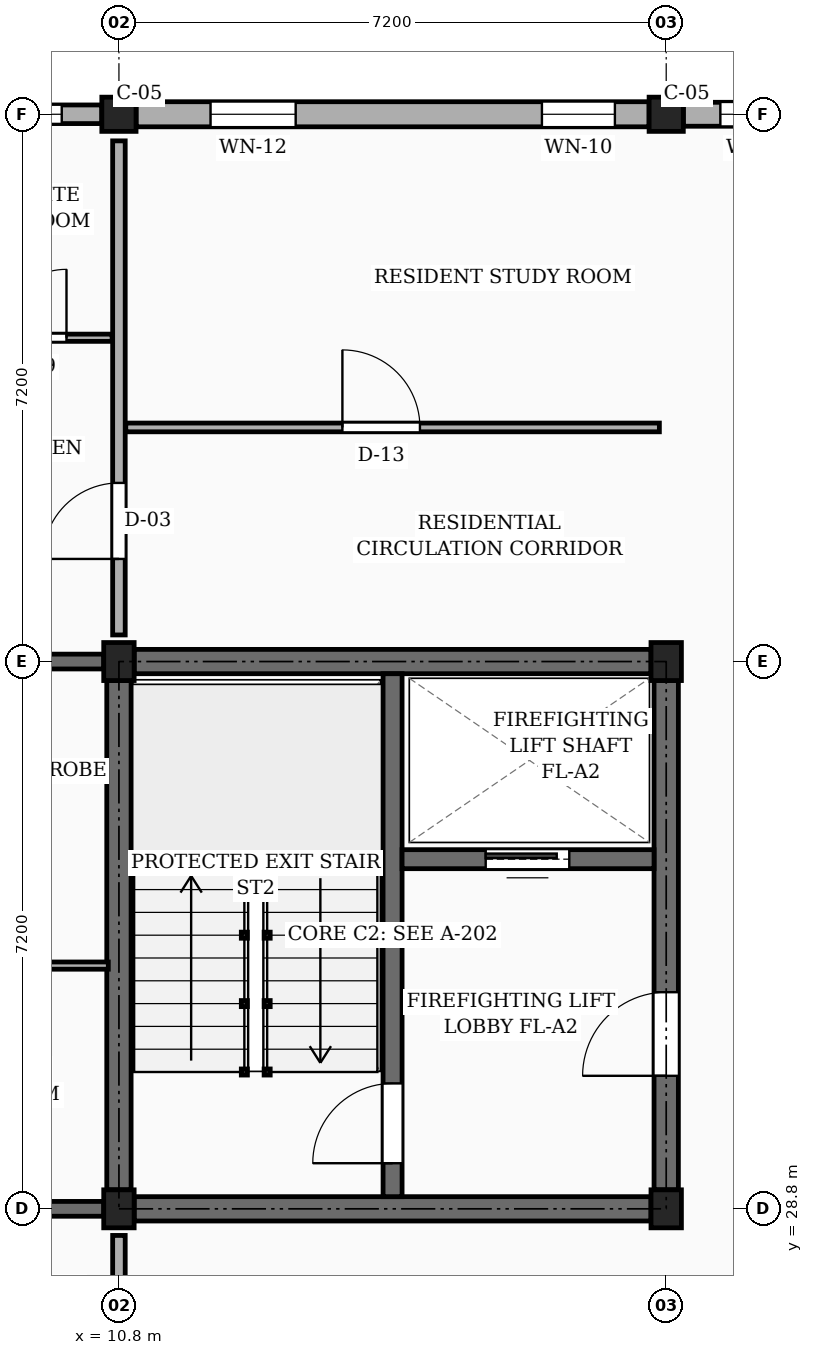
"""IFC4 building model, lengths in metres.
Left out: names, types, materials, properties, quantities, classifications, styles, units other than length and angle.
Written with IfcOpenShell. Run it as: python <this file> out.ifc"""

import sys

from ifc_helpers import new_model, si_unit, direction, frame, frame_2d, origin, origin_2d, place, context, subcontext, project, spatial, rectangle, extrude, element, fill, save


model = new_model("IFC4")
c1 = context("Model", 3, precision=1e-05, world=origin(), true_north=direction((0.0, 1.0)))
c2 = subcontext(c1, "Body", "Model", "MODEL_VIEW")
j1 = project(units=[si_unit("LENGTHUNIT", "METRE"), si_unit("PLANEANGLEUNIT", "RADIAN")], contexts=[c1])
p1 = place(None, origin())
s1 = spatial("IfcSite", under=j1, at=p1, CompositionType="ELEMENT")
p2 = place(p1, origin())
s2 = spatial("IfcBuilding", under=s1, at=p2, CompositionType="ELEMENT")
p3 = place(p2, frame((0.0, 0.0, 42.3)))
s3 = spatial("IfcBuildingStorey", under=s2, at=p3, CompositionType="ELEMENT", Elevation=42.3)
for number, where, z_axis, x_axis in (
    (1, (10.8, 28.8, 0.0), (0.0, 0.0, 1.0), (1.0, 0.0, 0.0)),
    (2, (10.8, 36.0, 0.0), (0.0, 0.0, 1.0), (1.0, 0.0, 0.0)),
):
    element("IfcColumn", number, at=place(p3, frame(where, z_axis=z_axis, x_axis=x_axis)), inside=s3, PredefinedType="COLUMN", context=c2, shape_type="SweptSolid", body=[
        extrude(rectangle(XDim=0.4, YDim=0.5, at=origin_2d()), origin(), (0.0, 0.0, 1.0), 3.15),
    ])
p4 = place(p3, frame((10.8, 43.2, 0.0), z_axis=(0.0, 0.0, 1.0), x_axis=(1.0, 0.0, 0.0)))
e3 = element("IfcColumn", 3, at=p4, inside=s3, PredefinedType="COLUMN", context=c2, shape_type="SweptSolid", body=[
    extrude(rectangle(XDim=0.45, YDim=0.45, at=origin_2d()), origin(), (0.0, 0.0, 1.0), 3.15),
])
for number, where, z_axis, x_axis in (
    (4, (18.0, 28.8, 0.0), (0.0, 0.0, 1.0), (1.0, 0.0, 0.0)),
    (5, (18.0, 36.0, 0.0), (0.0, 0.0, 1.0), (1.0, 0.0, 0.0)),
):
    element("IfcColumn", number, at=place(p3, frame(where, z_axis=z_axis, x_axis=x_axis)), inside=s3, PredefinedType="COLUMN", context=c2, shape_type="SweptSolid", body=[
        extrude(rectangle(XDim=0.4, YDim=0.5, at=origin_2d()), origin(), (0.0, 0.0, 1.0), 3.15),
    ])
p5 = place(p3, frame((18.0, 43.2, 0.0), z_axis=(0.0, 0.0, 1.0), x_axis=(1.0, 0.0, 0.0)))
e6 = element("IfcColumn", 6, at=p5, inside=s3, PredefinedType="COLUMN", context=c2, shape_type="SweptSolid", body=[
    extrude(rectangle(XDim=0.45, YDim=0.45, at=origin_2d()), origin(), (0.0, 0.0, 1.0), 3.15),
])
p6 = place(p3, frame((3.825, 28.8, 0.0), z_axis=(0.0, 0.0, 1.0), x_axis=(1.0, 0.0, 0.0)))
e7 = element("IfcWall", 7, at=p6, inside=s3, PredefinedType="SOLIDWALL", context=c2, shape_type="SweptSolid", body=[
    extrude(rectangle(XDim=6.775, YDim=0.195, at=frame_2d((3.388, 0.0))), origin(), (0.0, 0.0, 1.0), 2.17),
])
p7 = place(p6, frame((1.35, 0.0, 0.0)))
e8 = element("IfcOpeningElement", 8, at=p7, cuts=e7, PredefinedType="OPENING", context=c2, shape_type="SweptSolid", body=[
    extrude(rectangle(XDim=0.98, YDim=2.12, at=frame_2d((0.49, 1.06))), frame((0.0, 0.107, 0.0), z_axis=(0.0, -1.0, 0.0), x_axis=(1.0, 0.0, 0.0)), (0.0, 0.0, 1.0), 0.215),
])
p8 = place(p3, frame((3.825, 36.0, 0.0), z_axis=(0.0, 0.0, 1.0), x_axis=(1.0, 0.0, 0.0)))
e9 = element("IfcWall", 9, at=p8, inside=s3, PredefinedType="SOLIDWALL", context=c2, shape_type="SweptSolid", body=[
    extrude(rectangle(XDim=6.775, YDim=0.195, at=frame_2d((3.388, 0.0))), origin(), (0.0, 0.0, 1.0), 2.17),
])
p9 = place(p3, frame((24.975, 43.2, 0.0), z_axis=(0.0, 0.0, 1.0), x_axis=(-1.0, 0.0, 0.0)))
e10 = element("IfcWall", 10, at=p9, inside=s3, PredefinedType="SOLIDWALL", context=c2, shape_type="SweptSolid", body=[
    extrude(rectangle(XDim=6.75, YDim=0.315, at=frame_2d((3.375, 0.0))), origin(), (0.0, 0.0, 1.0), 2.44),
])
p10 = place(p9, frame((0.917, 0.0, 0.78)))
e11 = element("IfcOpeningElement", 11, at=p10, cuts=e10, PredefinedType="OPENING", context=c2, shape_type="SweptSolid", body=[
    extrude(rectangle(XDim=1.32, YDim=1.15, at=frame_2d((0.66, 0.575))), frame((0.0, 0.167, 0.0), z_axis=(0.0, -1.0, 0.0), x_axis=(1.0, 0.0, 0.0)), (0.0, 0.0, 1.0), 0.335),
])
p11 = place(p9, frame((3.505, 0.0, 0.78)))
e12 = element("IfcOpeningElement", 12, at=p11, cuts=e10, PredefinedType="OPENING", context=c2, shape_type="SweptSolid", body=[
    extrude(rectangle(XDim=0.88, YDim=1.26, at=frame_2d((0.44, 0.63))), frame((0.0, 0.167, 0.0), z_axis=(0.0, -1.0, 0.0), x_axis=(1.0, 0.0, 0.0)), (0.0, 0.0, 1.0), 0.335),
])
p12 = place(p9, frame((5.222, 0.0, 0.78)))
e13 = element("IfcOpeningElement", 13, at=p12, cuts=e10, PredefinedType="OPENING", context=c2, shape_type="SweptSolid", body=[
    extrude(rectangle(XDim=1.04, YDim=1.26, at=frame_2d((0.52, 0.63))), frame((0.0, 0.167, 0.0), z_axis=(0.0, -1.0, 0.0), x_axis=(1.0, 0.0, 0.0)), (0.0, 0.0, 1.0), 0.335),
])
p13 = place(p3, frame((17.775, 43.2, 0.0), z_axis=(0.0, 0.0, 1.0), x_axis=(-1.0, 0.0, 0.0)))
e14 = element("IfcWall", 14, at=p13, inside=s3, PredefinedType="SOLIDWALL", context=c2, shape_type="SweptSolid", body=[
    extrude(rectangle(XDim=6.75, YDim=0.33, at=frame_2d((3.375, 0.0))), origin(), (0.0, 0.0, 1.0), 2.44),
])
p14 = place(p13, frame((0.45, 0.0, 0.78)))
e15 = element("IfcOpeningElement", 15, at=p14, cuts=e14, PredefinedType="OPENING", context=c2, shape_type="SweptSolid", body=[
    extrude(rectangle(XDim=0.96, YDim=1.26, at=frame_2d((0.48, 0.63))), frame((0.0, 0.175, 0.0), z_axis=(0.0, -1.0, 0.0), x_axis=(1.0, 0.0, 0.0)), (0.0, 0.0, 1.0), 0.35),
])
p15 = place(p13, frame((4.65, 0.0, 0.78)))
e16 = element("IfcOpeningElement", 16, at=p15, cuts=e14, PredefinedType="OPENING", context=c2, shape_type="SweptSolid", body=[
    extrude(rectangle(XDim=1.12, YDim=1.26, at=frame_2d((0.56, 0.63))), frame((0.0, 0.175, 0.0), z_axis=(0.0, -1.0, 0.0), x_axis=(1.0, 0.0, 0.0)), (0.0, 0.0, 1.0), 0.35),
])
p16 = place(p3, frame((10.575, 43.2, 0.0), z_axis=(0.0, 0.0, 1.0), x_axis=(-1.0, 0.0, 0.0)))
e17 = element("IfcWall", 17, at=p16, inside=s3, PredefinedType="SOLIDWALL", context=c2, shape_type="SweptSolid", body=[
    extrude(rectangle(XDim=6.75, YDim=0.245, at=frame_2d((3.375, 0.0))), origin(), (0.0, 0.0, 1.0), 2.44),
])
p17 = place(p16, frame((0.528, 0.0, 0.78)))
e18 = element("IfcOpeningElement", 18, at=p17, cuts=e17, PredefinedType="OPENING", context=c2, shape_type="SweptSolid", body=[
    extrude(rectangle(XDim=1.12, YDim=1.26, at=frame_2d((0.56, 0.63))), frame((0.0, 0.133, 0.0), z_axis=(0.0, -1.0, 0.0), x_axis=(1.0, 0.0, 0.0)), (0.0, 0.0, 1.0), 0.265),
])
p18 = place(p16, frame((3.683, 0.0, 0.78)))
e19 = element("IfcOpeningElement", 19, at=p18, cuts=e17, PredefinedType="OPENING", context=c2, shape_type="SweptSolid", body=[
    extrude(rectangle(XDim=1.28, YDim=1.26, at=frame_2d((0.64, 0.63))), frame((0.0, 0.133, 0.0), z_axis=(0.0, -1.0, 0.0), x_axis=(1.0, 0.0, 0.0)), (0.0, 0.0, 1.0), 0.265),
])
p19 = place(p3, frame((10.8, 29.05, 0.0), z_axis=(0.0, 0.0, 1.0), x_axis=(0.0, 1.0, 0.0)))
e20 = element("IfcWall", 20, at=p19, inside=s3, PredefinedType="SHEAR", context=c2, shape_type="SweptSolid", body=[
    extrude(rectangle(XDim=6.7, YDim=0.32, at=frame_2d((3.35, 0.0))), origin(), (0.0, 0.0, 1.0), 2.87),
])
p20 = place(p3, frame((11.0, 36.0, 0.0), z_axis=(0.0, 0.0, 1.0), x_axis=(1.0, 0.0, 0.0)))
e21 = element("IfcWall", 21, at=p20, inside=s3, PredefinedType="SHEAR", context=c2, shape_type="SweptSolid", body=[
    extrude(rectangle(XDim=6.8, YDim=0.32, at=frame_2d((3.4, 0.0))), origin(), (0.0, 0.0, 1.0), 2.87),
])
p21 = place(p3, frame((18.0, 29.05, 0.0), z_axis=(0.0, 0.0, 1.0), x_axis=(0.0, 1.0, 0.0)))
e22 = element("IfcWall", 22, at=p21, inside=s3, PredefinedType="SHEAR", context=c2, shape_type="SweptSolid", body=[
    extrude(rectangle(XDim=6.7, YDim=0.32, at=frame_2d((3.35, 0.0))), origin(), (0.0, 0.0, 1.0), 2.87),
])
p22 = place(p21, frame((1.5, 0.0, 0.0)))
e23 = element("IfcOpeningElement", 23, at=p22, cuts=e22, PredefinedType="OPENING", context=c2, shape_type="SweptSolid", body=[
    extrude(rectangle(XDim=1.1, YDim=2.15, at=frame_2d((0.55, 1.075))), frame((0.0, 0.17, 0.0), z_axis=(0.0, -1.0, 0.0), x_axis=(1.0, 0.0, 0.0)), (0.0, 0.0, 1.0), 0.34),
])
p23 = place(p3, frame((11.0, 28.8, 0.0), z_axis=(0.0, 0.0, 1.0), x_axis=(1.0, 0.0, 0.0)))
e24 = element("IfcWall", 24, at=p23, inside=s3, PredefinedType="SHEAR", context=c2, shape_type="SweptSolid", body=[
    extrude(rectangle(XDim=6.8, YDim=0.32, at=frame_2d((3.4, 0.0))), origin(), (0.0, 0.0, 1.0), 2.87),
])
p24 = place(p3, frame((14.4, 28.96, 0.0), z_axis=(0.0, 0.0, 1.0), x_axis=(0.0, 1.0, 0.0)))
e25 = element("IfcWall", 25, at=p24, inside=s3, PredefinedType="SHEAR", context=c2, shape_type="SweptSolid", body=[
    extrude(rectangle(XDim=6.88, YDim=0.25, at=frame_2d((3.44, 0.0))), origin(), (0.0, 0.0, 1.0), 2.87),
])
p25 = place(p24, frame((0.44, 0.0, 0.0)))
e26 = element("IfcOpeningElement", 26, at=p25, cuts=e25, PredefinedType="OPENING", context=c2, shape_type="SweptSolid", body=[
    extrude(rectangle(XDim=1.05, YDim=2.15, at=frame_2d((0.525, 1.075))), frame((0.0, 0.135, 0.0), z_axis=(0.0, -1.0, 0.0), x_axis=(1.0, 0.0, 0.0)), (0.0, 0.0, 1.0), 0.27),
])
p26 = place(p3, frame((14.525, 33.4, 0.0), z_axis=(0.0, 0.0, 1.0), x_axis=(1.0, 0.0, 0.0)))
e27 = element("IfcWall", 27, at=p26, inside=s3, PredefinedType="SHEAR", context=c2, shape_type="SweptSolid", body=[
    extrude(rectangle(XDim=3.315, YDim=0.25, at=frame_2d((1.658, 0.0))), origin(), (0.0, 0.0, 1.0), 2.87),
])
p27 = place(p26, frame((1.1, 0.0, 0.0)))
e28 = element("IfcOpeningElement", 28, at=p27, cuts=e27, PredefinedType="OPENING", context=c2, shape_type="SweptSolid", body=[
    extrude(rectangle(XDim=1.1, YDim=2.2, at=frame_2d((0.55, 1.1))), frame((0.0, 0.135, 0.0), z_axis=(0.0, -1.0, 0.0), x_axis=(1.0, 0.0, 0.0)), (0.0, 0.0, 1.0), 0.27),
])
p28 = place(p3, frame((10.8, 21.95, 0.0), z_axis=(0.0, 0.0, 1.0), x_axis=(0.0, 1.0, 0.0)))
e29 = element("IfcWall", 29, at=p28, inside=s3, PredefinedType="PARTITIONING", context=c2, shape_type="SweptSolid", body=[
    extrude(rectangle(XDim=6.5, YDim=0.165, at=frame_2d((3.25, 0.0))), origin(), (0.0, 0.0, 1.0), 2.305),
])
p29 = place(p28, frame((1.0, 0.0, 0.0)))
e30 = element("IfcOpeningElement", 30, at=p29, cuts=e29, PredefinedType="OPENING", context=c2, shape_type="SweptSolid", body=[
    extrude(rectangle(XDim=1.14, YDim=2.18, at=frame_2d((0.57, 1.09))), frame((0.0, 0.093, 0.0), z_axis=(0.0, -1.0, 0.0), x_axis=(1.0, 0.0, 0.0)), (0.0, 0.0, 1.0), 0.185),
])
p30 = place(p3, frame((10.8, 36.35, 0.0), z_axis=(0.0, 0.0, 1.0), x_axis=(0.0, 1.0, 0.0)))
e31 = element("IfcWall", 31, at=p30, inside=s3, PredefinedType="PARTITIONING", context=c2, shape_type="SweptSolid", body=[
    extrude(rectangle(XDim=6.5, YDim=0.165, at=frame_2d((3.25, 0.0))), origin(), (0.0, 0.0, 1.0), 2.305),
])
p31 = place(p30, frame((1.0, 0.0, 0.0)))
e32 = element("IfcOpeningElement", 32, at=p31, cuts=e31, PredefinedType="OPENING", context=c2, shape_type="SweptSolid", body=[
    extrude(rectangle(XDim=1.0, YDim=2.15, at=frame_2d((0.5, 1.075))), frame((0.0, 0.093, 0.0), z_axis=(0.0, -1.0, 0.0), x_axis=(1.0, 0.0, 0.0)), (0.0, 0.0, 1.0), 0.185),
])
p32 = place(p3, frame((7.27, 32.0, 0.0), z_axis=(0.0, 0.0, 1.0), x_axis=(1.0, 0.0, 0.0)))
e33 = element("IfcWall", 33, at=p32, inside=s3, PredefinedType="PARTITIONING", context=c2, shape_type="SweptSolid", body=[
    extrude(rectangle(XDim=3.39, YDim=0.095, at=frame_2d((1.695, 0.0))), origin(), (0.0, 0.0, 1.0), 2.305),
])
p33 = place(p3, frame((10.89, 39.08, 0.0), z_axis=(0.0, 0.0, 1.0), x_axis=(1.0, 0.0, 0.0)))
e34 = element("IfcWall", 34, at=p33, inside=s3, PredefinedType="PARTITIONING", context=c2, shape_type="SweptSolid", body=[
    extrude(rectangle(XDim=7.02, YDim=0.115, at=frame_2d((3.51, 0.0))), origin(), (0.0, 0.0, 1.0), 2.305),
])
p34 = place(p33, frame((2.85, 0.0, 0.0)))
e35 = element("IfcOpeningElement", 35, at=p34, cuts=e34, PredefinedType="OPENING", context=c2, shape_type="SweptSolid", body=[
    extrude(rectangle(XDim=1.02, YDim=2.15, at=frame_2d((0.51, 1.075))), frame((0.0, 0.067, 0.0), z_axis=(0.0, -1.0, 0.0), x_axis=(1.0, 0.0, 0.0)), (0.0, 0.0, 1.0), 0.135),
])
p35 = place(p3, frame((8.61, 40.26, 0.0), z_axis=(0.0, 0.0, 1.0), x_axis=(1.0, 0.0, 0.0)))
e36 = element("IfcWall", 36, at=p35, inside=s3, PredefinedType="PARTITIONING", context=c2, shape_type="SweptSolid", body=[
    extrude(rectangle(XDim=2.1, YDim=0.095, at=frame_2d((1.05, 0.0))), origin(), (0.0, 0.0, 1.0), 2.305),
])
p36 = place(p35, frame((0.6, 0.0, 0.0)))
e37 = element("IfcOpeningElement", 37, at=p36, cuts=e36, PredefinedType="OPENING", context=c2, shape_type="SweptSolid", body=[
    extrude(rectangle(XDim=0.9, YDim=2.05, at=frame_2d((0.45, 1.025))), frame((0.0, 0.058, 0.0), z_axis=(0.0, -1.0, 0.0), x_axis=(1.0, 0.0, 0.0)), (0.0, 0.0, 1.0), 0.115),
])
p37 = place(p12, origin())
e38 = element("IfcWindow", 38, at=p37, inside=s3, PartitioningType="SINGLE_PANEL", PredefinedType="WINDOW", context=c2, shape_type="SweptSolid", body=[
    extrude(rectangle(XDim=1.04, YDim=1.26, at=frame_2d((0.52, 0.63))), frame((0.0, 0.03, 0.0), z_axis=(0.0, -1.0, 0.0), x_axis=(1.0, 0.0, 0.0)), (0.0, 0.0, 1.0), 0.06),
])
fill(e13, e38)
p38 = place(p14, origin())
e39 = element("IfcWindow", 39, at=p38, inside=s3, PartitioningType="SINGLE_PANEL", PredefinedType="WINDOW", context=c2, shape_type="SweptSolid", body=[
    extrude(rectangle(XDim=0.96, YDim=1.26, at=frame_2d((0.48, 0.63))), frame((0.0, 0.03, 0.0), z_axis=(0.0, -1.0, 0.0), x_axis=(1.0, 0.0, 0.0)), (0.0, 0.0, 1.0), 0.06),
])
fill(e15, e39)
p39 = place(p15, origin())
e40 = element("IfcWindow", 40, at=p39, inside=s3, PartitioningType="SINGLE_PANEL", PredefinedType="WINDOW", context=c2, shape_type="SweptSolid", body=[
    extrude(rectangle(XDim=1.12, YDim=1.26, at=frame_2d((0.56, 0.63))), frame((0.0, 0.03, 0.0), z_axis=(0.0, -1.0, 0.0), x_axis=(1.0, 0.0, 0.0)), (0.0, 0.0, 1.0), 0.06),
])
fill(e16, e40)
p40 = place(p17, origin())
e41 = element("IfcWindow", 41, at=p40, inside=s3, PartitioningType="SINGLE_PANEL", PredefinedType="WINDOW", context=c2, shape_type="SweptSolid", body=[
    extrude(rectangle(XDim=1.12, YDim=1.26, at=frame_2d((0.56, 0.63))), frame((0.0, 0.03, 0.0), z_axis=(0.0, -1.0, 0.0), x_axis=(1.0, 0.0, 0.0)), (0.0, 0.0, 1.0), 0.06),
])
fill(e18, e41)
p41 = place(p22, frame((1.1, 0.0, 0.0), z_axis=(0.0, 0.0, 1.0), x_axis=(-1.0, 0.0, 0.0)))
e42 = element("IfcDoor", 42, at=p41, inside=s3, OperationType="SINGLE_SWING_LEFT", PredefinedType="DOOR", context=c2, shape_type="SweptSolid", body=[
    extrude(rectangle(XDim=1.1, YDim=2.15, at=frame_2d((0.55, 1.075))), frame((0.0, 0.025, 0.0), z_axis=(0.0, -1.0, 0.0), x_axis=(1.0, 0.0, 0.0)), (0.0, 0.0, 1.0), 0.05),
])
fill(e23, e42)
p42 = place(p25, origin())
e43 = element("IfcDoor", 43, at=p42, inside=s3, OperationType="SINGLE_SWING_LEFT", PredefinedType="DOOR", context=c2, shape_type="SweptSolid", body=[
    extrude(rectangle(XDim=1.05, YDim=2.15, at=frame_2d((0.525, 1.075))), frame((0.0, 0.025, 0.0), z_axis=(0.0, -1.0, 0.0), x_axis=(1.0, 0.0, 0.0)), (0.0, 0.0, 1.0), 0.05),
])
fill(e26, e43)
p43 = place(p27, origin())
e44 = element("IfcDoor", 44, at=p43, inside=s3, OperationType="SLIDING_TO_LEFT", PredefinedType="DOOR", context=c2, shape_type="SweptSolid", body=[
    extrude(rectangle(XDim=1.1, YDim=2.2, at=frame_2d((0.55, 1.1))), frame((0.0, 0.025, 0.0), z_axis=(0.0, -1.0, 0.0), x_axis=(1.0, 0.0, 0.0)), (0.0, 0.0, 1.0), 0.05),
])
fill(e28, e44)
p44 = place(p31, origin())
e45 = element("IfcDoor", 45, at=p44, inside=s3, OperationType="SINGLE_SWING_LEFT", PredefinedType="DOOR", context=c2, shape_type="SweptSolid", body=[
    extrude(rectangle(XDim=1.0, YDim=2.15, at=frame_2d((0.5, 1.075))), frame((0.0, 0.025, 0.0), z_axis=(0.0, -1.0, 0.0), x_axis=(1.0, 0.0, 0.0)), (0.0, 0.0, 1.0), 0.05),
])
fill(e32, e45)
p45 = place(p34, origin())
e46 = element("IfcDoor", 46, at=p45, inside=s3, OperationType="SINGLE_SWING_LEFT", PredefinedType="DOOR", context=c2, shape_type="SweptSolid", body=[
    extrude(rectangle(XDim=1.02, YDim=2.15, at=frame_2d((0.51, 1.075))), frame((0.0, 0.025, 0.0), z_axis=(0.0, -1.0, 0.0), x_axis=(1.0, 0.0, 0.0)), (0.0, 0.0, 1.0), 0.05),
])
fill(e35, e46)
p46 = place(p36, origin())
e47 = element("IfcDoor", 47, at=p46, inside=s3, OperationType="SINGLE_SWING_RIGHT", PredefinedType="DOOR", context=c2, shape_type="SweptSolid", body=[
    extrude(rectangle(XDim=0.9, YDim=2.05, at=frame_2d((0.45, 1.025))), frame((0.0, 0.025, 0.0), z_axis=(0.0, -1.0, 0.0), x_axis=(1.0, 0.0, 0.0)), (0.0, 0.0, 1.0), 0.05),
])
fill(e37, e47)
save(model, sys.argv[1])
